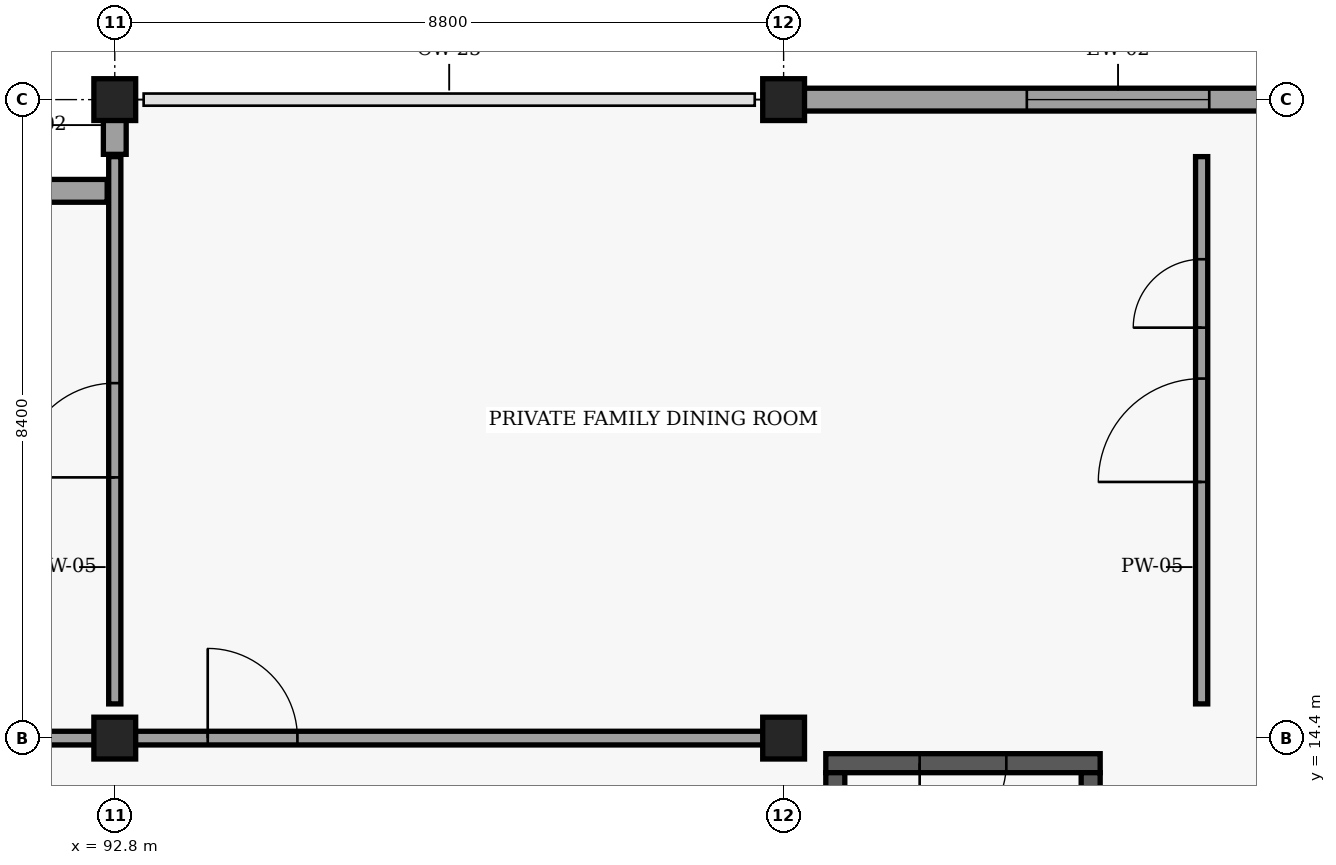
"""IFC4 building model, lengths in metres.
Left out: names, types, materials, properties, quantities, classifications, styles, units other than length and angle.
Written with IfcOpenShell. Run it as: python <this file> out.ifc"""

import sys

from ifc_helpers import new_model, si_unit, direction, frame, frame_2d, origin, origin_2d, place, context, subcontext, project, spatial, rectangle, extrude, element, fill, save


model = new_model("IFC4")
c1 = context("Model", 3, precision=1e-05, world=origin(), true_north=direction((0.0, 1.0)))
c2 = subcontext(c1, "Body", "Model", "MODEL_VIEW")
j1 = project(units=[si_unit("LENGTHUNIT", "METRE"), si_unit("PLANEANGLEUNIT", "RADIAN")], contexts=[c1])
p1 = place(None, origin())
s1 = spatial("IfcSite", under=j1, at=p1, CompositionType="ELEMENT")
p2 = place(p1, origin())
s2 = spatial("IfcBuilding", under=s1, at=p2, CompositionType="ELEMENT")
p3 = place(p2, origin())
s3 = spatial("IfcBuildingStorey", under=s2, at=p3, CompositionType="ELEMENT", Elevation=0.0)
for number, where, z_axis, x_axis in (
    (1, (92.8, 14.4, 0.0), (0.0, 0.0, 1.0), (1.0, 0.0, 0.0)),
    (2, (92.8, 22.8, 0.0), (0.0, 0.0, 1.0), (1.0, 0.0, 0.0)),
    (3, (101.6, 14.4, 0.0), (0.0, 0.0, 1.0), (1.0, 0.0, 0.0)),
    (4, (101.6, 22.8, 0.0), (0.0, 0.0, 1.0), (1.0, 0.0, 0.0)),
):
    element("IfcColumn", number, at=place(p3, frame(where, z_axis=z_axis, x_axis=x_axis)), inside=s3, PredefinedType="COLUMN", context=c2, shape_type="SweptSolid", body=[
        extrude(rectangle(XDim=0.55, YDim=0.55, at=origin_2d()), origin(), (0.0, 0.0, 1.0), 4.8),
    ])
p4 = place(p3, frame((84.1, 21.6, 0.0), z_axis=(0.0, 0.0, 1.0), x_axis=(1.0, 0.0, 0.0)))
e5 = element("IfcWall", 5, at=p4, inside=s3, PredefinedType="SOLIDWALL", context=c2, shape_type="SweptSolid", body=[
    extrude(rectangle(XDim=8.6, YDim=0.3, at=frame_2d((4.3, 0.0))), origin(), (0.0, 0.0, 1.0), 4.35),
])
p5 = place(p4, frame((3.1, 0.0, 0.9)))
e6 = element("IfcOpeningElement", 6, at=p5, cuts=e5, PredefinedType="OPENING", context=c2, shape_type="SweptSolid", body=[
    extrude(rectangle(XDim=2.4, YDim=2.1, at=frame_2d((1.2, 1.05))), frame((0.0, 0.16, 0.0), z_axis=(0.0, -1.0, 0.0), x_axis=(1.0, 0.0, 0.0)), (0.0, 0.0, 1.0), 0.32),
])
p6 = place(p3, frame((101.7, 22.8, 0.0), z_axis=(0.0, 0.0, 1.0), x_axis=(1.0, 0.0, 0.0)))
e7 = element("IfcWall", 7, at=p6, inside=s3, PredefinedType="SOLIDWALL", context=c2, shape_type="SweptSolid", body=[
    extrude(rectangle(XDim=8.6, YDim=0.3, at=frame_2d((4.3, 0.0))), origin(), (0.0, 0.0, 1.0), 4.065),
])
p7 = place(p6, frame((3.1, 0.0, 0.9)))
e8 = element("IfcOpeningElement", 8, at=p7, cuts=e7, PredefinedType="OPENING", context=c2, shape_type="SweptSolid", body=[
    extrude(rectangle(XDim=2.4, YDim=2.1, at=frame_2d((1.2, 1.05))), frame((0.0, 0.16, 0.0), z_axis=(0.0, -1.0, 0.0), x_axis=(1.0, 0.0, 0.0)), (0.0, 0.0, 1.0), 0.32),
])
p8 = place(p3, frame((92.8, 22.08, 0.0), z_axis=(0.0, 0.0, 1.0), x_axis=(0.0, 1.0, 0.0)))
e9 = element("IfcWall", 9, at=p8, inside=s3, PredefinedType="SOLIDWALL", context=c2, shape_type="SweptSolid", body=[
    extrude(rectangle(XDim=0.77, YDim=0.3, at=frame_2d((0.385, 0.0))), origin(), (0.0, 0.0, 1.0), 3.845),
])
p9 = place(p3, frame((102.155, 14.07, 0.0), z_axis=(0.0, 0.0, 1.0), x_axis=(1.0, 0.0, 0.0)))
e10 = element("IfcWall", 10, at=p9, inside=s3, PredefinedType="SHEAR", context=c2, shape_type="SweptSolid", body=[
    extrude(rectangle(XDim=3.61, YDim=0.25, at=frame_2d((1.805, 0.0))), origin(), (0.0, 0.0, 1.0), 4.56),
])
p10 = place(p9, frame((1.235, 0.0, 0.0)))
e11 = element("IfcOpeningElement", 11, at=p10, cuts=e10, PredefinedType="OPENING", context=c2, shape_type="SweptSolid", body=[
    extrude(rectangle(XDim=1.14, YDim=2.15, at=frame_2d((0.57, 1.075))), frame((0.0, 0.135, 0.0), z_axis=(0.0, -1.0, 0.0), x_axis=(1.0, 0.0, 0.0)), (0.0, 0.0, 1.0), 0.27),
])
for number, where, z_axis, x_axis in (
    (12, (105.64, 13.945, 0.0), (0.0, 0.0, 1.0), (0.0, -1.0, 0.0)),
    (13, (102.28, 6.555, 0.0), (0.0, 0.0, 1.0), (0.0, 1.0, 0.0)),
):
    element("IfcWall", number, at=place(p3, frame(where, z_axis=z_axis, x_axis=x_axis)), inside=s3, PredefinedType="SHEAR", context=c2, shape_type="SweptSolid", body=[
        extrude(rectangle(XDim=7.39, YDim=0.25, at=frame_2d((3.695, 0.0))), origin(), (0.0, 0.0, 1.0), 4.56),
    ])
p11 = place(p3, frame((70.5, 14.4, 0.0), z_axis=(0.0, 0.0, 1.0), x_axis=(1.0, 0.0, 0.0)))
e14 = element("IfcWall", 14, at=p11, inside=s3, PredefinedType="PARTITIONING", context=c2, shape_type="SweptSolid", body=[
    extrude(rectangle(XDim=30.95, YDim=0.18, at=frame_2d((15.475, 0.0))), origin(), (0.0, 0.0, 1.0), 3.795),
])
p12 = place(p11, frame((7.257, 0.0, 0.0)))
e15 = element("IfcOpeningElement", 15, at=p12, cuts=e14, PredefinedType="OPENING", context=c2, shape_type="SweptSolid", body=[
    extrude(rectangle(XDim=0.96, YDim=2.08, at=frame_2d((0.48, 1.04))), frame((0.0, 0.1, 0.0), z_axis=(0.0, -1.0, 0.0), x_axis=(1.0, 0.0, 0.0)), (0.0, 0.0, 1.0), 0.2),
])
p13 = place(p11, frame((15.025, 0.0, 0.0)))
e16 = element("IfcOpeningElement", 16, at=p13, cuts=e14, PredefinedType="OPENING", context=c2, shape_type="SweptSolid", body=[
    extrude(rectangle(XDim=0.9, YDim=2.06, at=frame_2d((0.45, 1.03))), frame((0.0, 0.1, 0.0), z_axis=(0.0, -1.0, 0.0), x_axis=(1.0, 0.0, 0.0)), (0.0, 0.0, 1.0), 0.2),
])
p14 = place(p11, frame((23.523, 0.0, 0.0)))
e17 = element("IfcOpeningElement", 17, at=p14, cuts=e14, PredefinedType="OPENING", context=c2, shape_type="SweptSolid", body=[
    extrude(rectangle(XDim=1.18, YDim=2.18, at=frame_2d((0.59, 1.09))), frame((0.0, 0.1, 0.0), z_axis=(0.0, -1.0, 0.0), x_axis=(1.0, 0.0, 0.0)), (0.0, 0.0, 1.0), 0.2),
])
p15 = place(p3, frame((92.8, 14.85, 0.0), z_axis=(0.0, 0.0, 1.0), x_axis=(0.0, 1.0, 0.0)))
e18 = element("IfcWall", 18, at=p15, inside=s3, PredefinedType="PARTITIONING", context=c2, shape_type="SweptSolid", body=[
    extrude(rectangle(XDim=7.2, YDim=0.16, at=frame_2d((3.6, 0.0))), origin(), (0.0, 0.0, 1.0), 3.845),
])
p16 = place(p15, frame((2.98, 0.0, 0.0)))
e19 = element("IfcOpeningElement", 19, at=p16, cuts=e18, PredefinedType="OPENING", context=c2, shape_type="SweptSolid", body=[
    extrude(rectangle(XDim=1.24, YDim=2.2, at=frame_2d((0.62, 1.1))), frame((0.0, 0.09, 0.0), z_axis=(0.0, -1.0, 0.0), x_axis=(1.0, 0.0, 0.0)), (0.0, 0.0, 1.0), 0.18),
])
p17 = place(p3, frame((107.1, 14.85, 0.0), z_axis=(0.0, 0.0, 1.0), x_axis=(0.0, 1.0, 0.0)))
e20 = element("IfcWall", 20, at=p17, inside=s3, PredefinedType="PARTITIONING", context=c2, shape_type="SweptSolid", body=[
    extrude(rectangle(XDim=7.2, YDim=0.16, at=frame_2d((3.6, 0.0))), origin(), (0.0, 0.0, 1.0), 4.545),
])
p18 = place(p17, frame((2.92, 0.0, 0.0)))
e21 = element("IfcOpeningElement", 21, at=p18, cuts=e20, PredefinedType="OPENING", context=c2, shape_type="SweptSolid", body=[
    extrude(rectangle(XDim=1.36, YDim=2.22, at=frame_2d((0.68, 1.11))), frame((0.0, 0.09, 0.0), z_axis=(0.0, -1.0, 0.0), x_axis=(1.0, 0.0, 0.0)), (0.0, 0.0, 1.0), 0.18),
])
p19 = place(p17, frame((4.95, 0.0, 0.0)))
e22 = element("IfcOpeningElement", 22, at=p19, cuts=e20, PredefinedType="OPENING", context=c2, shape_type="SweptSolid", body=[
    extrude(rectangle(XDim=0.9, YDim=2.06, at=frame_2d((0.45, 1.03))), frame((0.0, 0.09, 0.0), z_axis=(0.0, -1.0, 0.0), x_axis=(1.0, 0.0, 0.0)), (0.0, 0.0, 1.0), 0.18),
])
p20 = place(p7, origin())
e23 = element("IfcWindow", 23, at=p20, inside=s3, PartitioningType="SINGLE_PANEL", PredefinedType="WINDOW", context=c2, shape_type="SweptSolid", body=[
    extrude(rectangle(XDim=2.4, YDim=2.1, at=frame_2d((1.2, 1.05))), frame((0.0, 0.03, 0.0), z_axis=(0.0, -1.0, 0.0), x_axis=(1.0, 0.0, 0.0)), (0.0, 0.0, 1.0), 0.06),
])
fill(e8, e23)
p21 = place(p10, origin())
e24 = element("IfcDoor", 24, at=p21, inside=s3, OperationType="SINGLE_SWING_RIGHT", PredefinedType="DOOR", context=c2, shape_type="SweptSolid", body=[
    extrude(rectangle(XDim=1.14, YDim=2.15, at=frame_2d((0.57, 1.075))), frame((0.0, 0.025, 0.0), z_axis=(0.0, -1.0, 0.0), x_axis=(1.0, 0.0, 0.0)), (0.0, 0.0, 1.0), 0.05),
])
fill(e11, e24)
p22 = place(p14, origin())
e25 = element("IfcDoor", 25, at=p22, inside=s3, OperationType="SINGLE_SWING_LEFT", PredefinedType="DOOR", context=c2, shape_type="SweptSolid", body=[
    extrude(rectangle(XDim=1.18, YDim=2.18, at=frame_2d((0.59, 1.09))), frame((0.0, 0.025, 0.0), z_axis=(0.0, -1.0, 0.0), x_axis=(1.0, 0.0, 0.0)), (0.0, 0.0, 1.0), 0.05),
])
fill(e17, e25)
p23 = place(p16, origin())
e26 = element("IfcDoor", 26, at=p23, inside=s3, OperationType="SINGLE_SWING_LEFT", PredefinedType="DOOR", context=c2, shape_type="SweptSolid", body=[
    extrude(rectangle(XDim=1.24, YDim=2.2, at=frame_2d((0.62, 1.1))), frame((0.0, 0.025, 0.0), z_axis=(0.0, -1.0, 0.0), x_axis=(1.0, 0.0, 0.0)), (0.0, 0.0, 1.0), 0.05),
])
fill(e19, e26)
p24 = place(p18, origin())
e27 = element("IfcDoor", 27, at=p24, inside=s3, OperationType="DOUBLE_DOOR_SINGLE_SWING", PredefinedType="DOOR", context=c2, shape_type="SweptSolid", body=[
    extrude(rectangle(XDim=1.36, YDim=2.22, at=frame_2d((0.68, 1.11))), frame((0.0, 0.025, 0.0), z_axis=(0.0, -1.0, 0.0), x_axis=(1.0, 0.0, 0.0)), (0.0, 0.0, 1.0), 0.05),
])
fill(e21, e27)
p25 = place(p19, origin())
e28 = element("IfcDoor", 28, at=p25, inside=s3, OperationType="SINGLE_SWING_LEFT", PredefinedType="DOOR", context=c2, shape_type="SweptSolid", body=[
    extrude(rectangle(XDim=0.9, YDim=2.06, at=frame_2d((0.45, 1.03))), frame((0.0, 0.025, 0.0), z_axis=(0.0, -1.0, 0.0), x_axis=(1.0, 0.0, 0.0)), (0.0, 0.0, 1.0), 0.05),
])
fill(e22, e28)
save(model, sys.argv[1])
